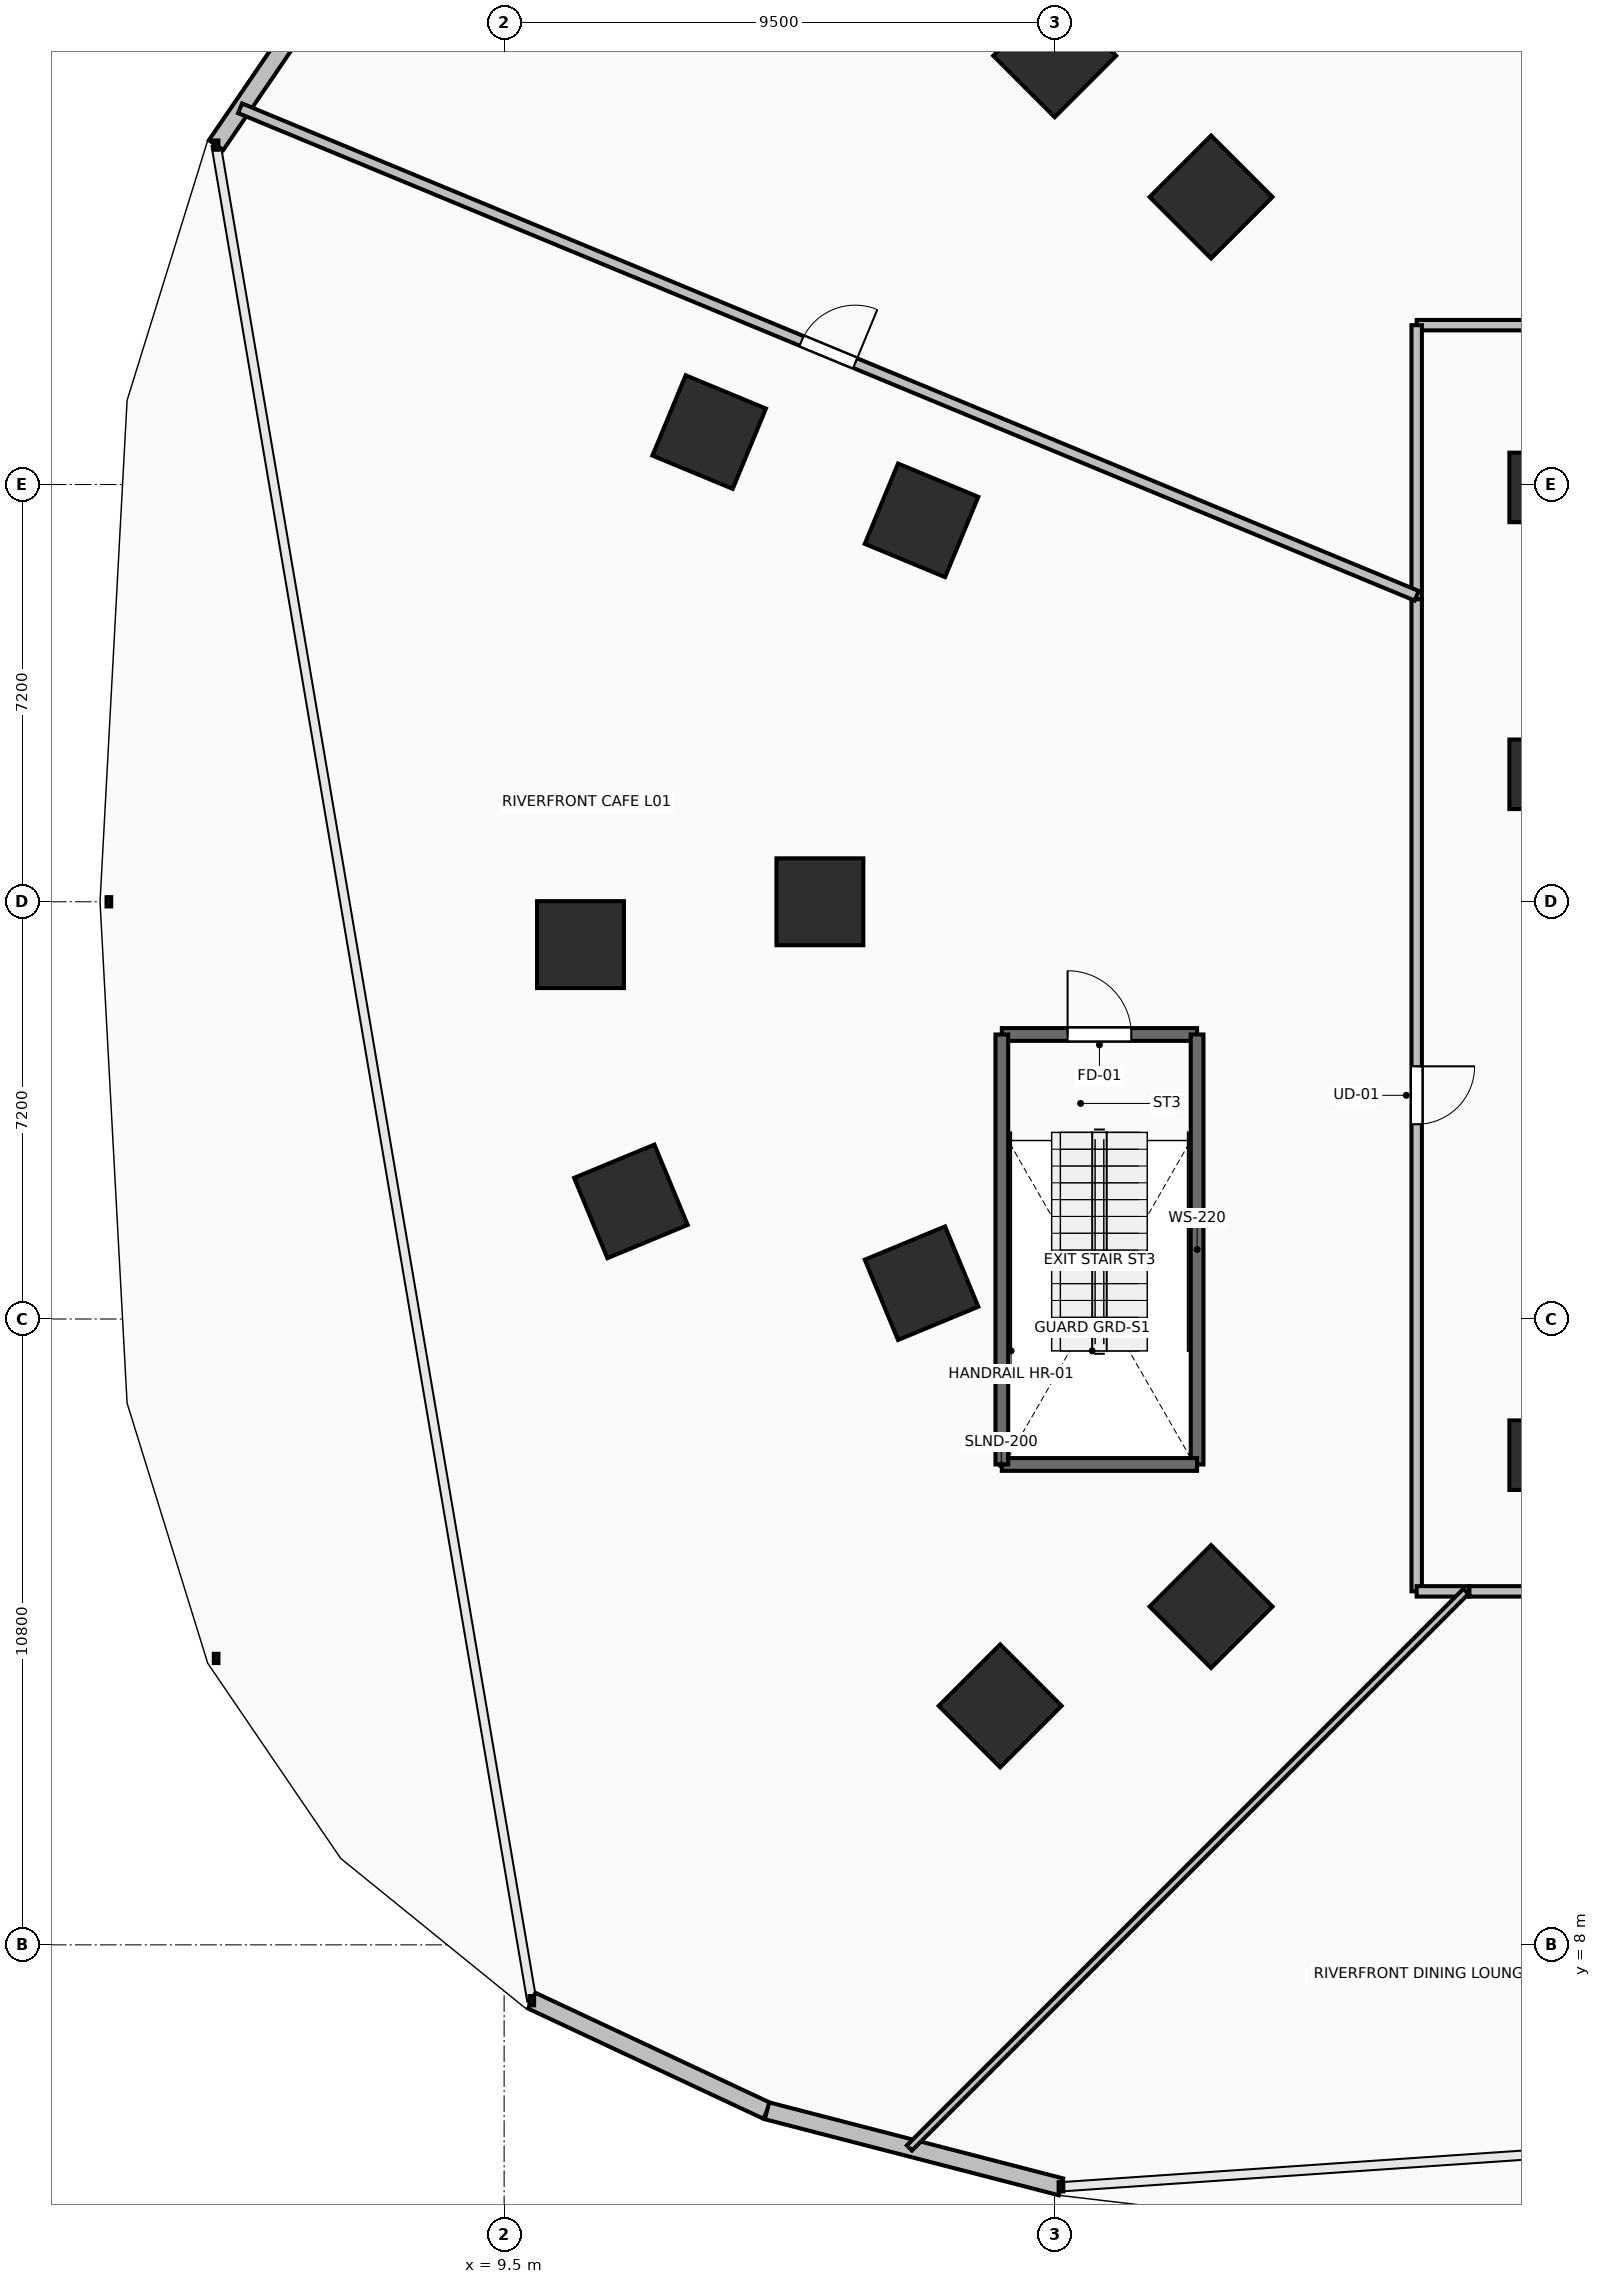
"""IFC4 building model, lengths in metres.
Left out: names, types, materials, properties, quantities, classifications, styles, units other than length and angle.
Written with IfcOpenShell. Run it as: python <this file> out.ifc"""

import sys

from ifc_helpers import new_model, si_unit, direction, frame, frame_2d, origin, origin_2d, place, context, subcontext, project, spatial, rectangle, extrude, element, fill, save


model = new_model("IFC4")
c1 = context("Model", 3, precision=1e-05, world=origin(), true_north=direction((0.0, 1.0)))
c2 = subcontext(c1, "Body", "Model", "MODEL_VIEW")
j1 = project(units=[si_unit("LENGTHUNIT", "METRE"), si_unit("PLANEANGLEUNIT", "RADIAN")], contexts=[c1])
p1 = place(None, origin())
s1 = spatial("IfcSite", under=j1, at=p1, CompositionType="ELEMENT")
p2 = place(p1, origin())
s2 = spatial("IfcBuilding", under=s1, at=p2, CompositionType="ELEMENT")
p3 = place(p2, frame((0.0, 0.0, 4.8)))
s3 = spatial("IfcBuildingStorey", under=s2, at=p3, CompositionType="ELEMENT", Elevation=4.8)
for number, where, z_axis, x_axis in (
    (1, (21.701, 38.162, 0.0), (0.0, 0.0, 1.0), (-0.707, 0.707, 0.0)),
    (2, (16.705, 32.582, 0.0), (0.0, 0.0, 1.0), (-0.924, 0.383, 0.0)),
    (3, (14.95, 26.0, 0.0), (0.0, 0.0, 1.0), (-1.0, 0.0, 0.0)),
    (4, (16.705, 19.418, 0.0), (0.0, 0.0, 1.0), (-0.924, -0.383, 0.0)),
    (5, (21.701, 13.838, 0.0), (0.0, 0.0, 1.0), (-0.707, -0.707, 0.0)),
    (6, (19.003, 40.6, 0.0), (0.0, 0.0, 1.0), (-0.707, 0.707, 0.0)),
    (7, (13.039, 34.105, 0.0), (0.0, 0.0, 1.0), (-0.924, 0.383, 0.0)),
    (8, (10.818, 25.261, 0.0), (0.0, 0.0, 1.0), (-1.0, 0.0, 0.0)),
    (9, (11.688, 20.83, 0.0), (0.0, 0.0, 1.0), (-0.924, -0.383, 0.0)),
    (10, (18.061, 12.124, 0.0), (0.0, 0.0, 1.0), (-0.707, -0.707, 0.0)),
):
    element("IfcColumn", number, at=place(p3, frame(where, z_axis=z_axis, x_axis=x_axis)), inside=s3, PredefinedType="COLUMN", context=c2, shape_type="SweptSolid", body=[
        extrude(rectangle(XDim=1.5, YDim=1.5, at=origin_2d()), origin(), (0.0, 0.0, 1.0), 4.8),
    ])
for number, where, z_axis, x_axis in (
    (11, (27.25, 16.45, 0.0), (0.0, 0.0, 1.0), (1.0, 0.0, 0.0)),
    (12, (27.25, 28.2, 0.0), (0.0, 0.0, 1.0), (1.0, 0.0, 0.0)),
    (13, (27.25, 33.15, 0.0), (0.0, 0.0, 1.0), (1.0, 0.0, 0.0)),
):
    element("IfcColumn", number, at=place(p3, frame(where, z_axis=z_axis, x_axis=x_axis)), inside=s3, PredefinedType="PILASTER", context=c2, shape_type="SweptSolid", body=[
        extrude(rectangle(XDim=0.8, YDim=1.2, at=origin_2d()), origin(), (0.0, 0.0, 1.0), 4.8),
    ])
p4 = place(p3, frame((6.813, 42.404, 0.0), z_axis=(0.0, 0.0, 1.0), x_axis=(-0.563802284854, -0.825909791438, 0.0)))
e14 = element("IfcWall", 14, at=p4, inside=s3, PredefinedType="STANDARD", context=c2, shape_type="SweptSolid", body=[
    extrude(rectangle(XDim=4.052, YDim=0.3, at=frame_2d((2.026, 0.0))), origin(), (0.0, 0.0, 1.0), 4.48),
])
p5 = place(p3, frame((9.978, 7.037, 0.0), z_axis=(0.0, 0.0, 1.0), x_axis=(0.905655072563, -0.424015199657, 0.0)))
e15 = element("IfcWall", 15, at=p5, inside=s3, PredefinedType="STANDARD", context=c2, shape_type="SweptSolid", body=[
    extrude(rectangle(XDim=4.482, YDim=0.3, at=frame_2d((2.241, 0.0))), origin(), (0.0, 0.0, 1.0), 4.48),
])
p6 = place(p3, frame((14.037, 5.136, 0.0), z_axis=(0.0, 0.0, 1.0), x_axis=(0.968182342492, -0.250245782556, 0.0)))
e16 = element("IfcWall", 16, at=p6, inside=s3, PredefinedType="STANDARD", context=c2, shape_type="SweptSolid", body=[
    extrude(rectangle(XDim=5.24, YDim=0.3, at=frame_2d((2.62, 0.0))), origin(), (0.0, 0.0, 1.0), 4.48),
])
p7 = place(p3, frame((18.09, 23.71, 0.0), z_axis=(0.0, 0.0, 1.0), x_axis=(1.0, 0.0, 0.0)))
e17 = element("IfcWall", 17, at=p7, inside=s3, PredefinedType="SOLIDWALL", context=c2, shape_type="SweptSolid", body=[
    extrude(rectangle(XDim=3.37, YDim=0.22, at=frame_2d((1.685, 0.0))), origin(), (0.0, 0.0, 1.0), 4.48),
])
p8 = place(p7, frame((1.135, 0.0, 0.0)))
e18 = element("IfcOpeningElement", 18, at=p8, cuts=e17, PredefinedType="OPENING", context=c2, shape_type="SweptSolid", body=[
    extrude(rectangle(XDim=1.1, YDim=2.15, at=frame_2d((0.55, 1.075))), frame((0.0, 0.125, 0.0), z_axis=(0.0, -1.0, 0.0), x_axis=(1.0, 0.0, 0.0)), (0.0, 0.0, 1.0), 0.25),
])
p9 = place(p3, frame((21.46, 23.71, 0.0), z_axis=(0.0, 0.0, 1.0), x_axis=(0.0, -1.0, 0.0)))
e19 = element("IfcWall", 19, at=p9, inside=s3, PredefinedType="SOLIDWALL", context=c2, shape_type="SweptSolid", body=[
    extrude(rectangle(XDim=7.42, YDim=0.22, at=frame_2d((3.71, 0.0))), origin(), (0.0, 0.0, 1.0), 4.48),
])
p10 = place(p3, frame((21.46, 16.29, 0.0), z_axis=(0.0, 0.0, 1.0), x_axis=(-1.0, 0.0, 0.0)))
e20 = element("IfcWall", 20, at=p10, inside=s3, PredefinedType="SOLIDWALL", context=c2, shape_type="SweptSolid", body=[
    extrude(rectangle(XDim=3.37, YDim=0.22, at=frame_2d((1.685, 0.0))), origin(), (0.0, 0.0, 1.0), 4.48),
])
p11 = place(p3, frame((18.09, 16.29, 0.0), z_axis=(0.0, 0.0, 1.0), x_axis=(0.0, 1.0, 0.0)))
e21 = element("IfcWall", 21, at=p11, inside=s3, PredefinedType="SOLIDWALL", context=c2, shape_type="SweptSolid", body=[
    extrude(rectangle(XDim=7.42, YDim=0.22, at=frame_2d((3.71, 0.0))), origin(), (0.0, 0.0, 1.0), 4.48),
])
p12 = place(p3, frame((37.94, 35.95, 0.0), z_axis=(0.0, 0.0, 1.0), x_axis=(-1.0, 0.0, 0.0)))
e22 = element("IfcWall", 22, at=p12, inside=s3, PredefinedType="PARTITIONING", context=c2, shape_type="SweptSolid", body=[
    extrude(rectangle(XDim=12.69, YDim=0.18, at=frame_2d((6.345, 0.0))), origin(), (0.0, 0.0, 1.0), 3.672),
])
p13 = place(p12, frame((5.745, 0.0, 0.0)))
e23 = element("IfcOpeningElement", 23, at=p13, cuts=e22, PredefinedType="OPENING", context=c2, shape_type="SweptSolid", body=[
    extrude(rectangle(XDim=1.2, YDim=2.15, at=frame_2d((0.6, 1.075))), frame((0.0, 0.105, 0.0), z_axis=(0.0, -1.0, 0.0), x_axis=(1.0, 0.0, 0.0)), (0.0, 0.0, 1.0), 0.21),
])
p14 = place(p3, frame((25.25, 35.95, 0.0), z_axis=(0.0, 0.0, 1.0), x_axis=(0.0, -1.0, 0.0)))
e24 = element("IfcWall", 24, at=p14, inside=s3, PredefinedType="PARTITIONING", context=c2, shape_type="SweptSolid", body=[
    extrude(rectangle(XDim=4.729, YDim=0.18, at=frame_2d((2.365, 0.0))), origin(), (0.0, 0.0, 1.0), 3.672),
])
p15 = place(p3, frame((25.25, 31.221, 0.0), z_axis=(0.0, 0.0, 1.0), x_axis=(0.0, -1.0, 0.0)))
e25 = element("IfcWall", 25, at=p15, inside=s3, PredefinedType="PARTITIONING", context=c2, shape_type="SweptSolid", body=[
    extrude(rectangle(XDim=17.121, YDim=0.18, at=frame_2d((8.561, 0.0))), origin(), (0.0, 0.0, 1.0), 3.672),
])
p16 = place(p15, frame((8.061, 0.0, 0.0)))
e26 = element("IfcOpeningElement", 26, at=p16, cuts=e25, PredefinedType="OPENING", context=c2, shape_type="SweptSolid", body=[
    extrude(rectangle(XDim=1.0, YDim=2.15, at=frame_2d((0.5, 1.075))), frame((0.0, 0.105, 0.0), z_axis=(0.0, -1.0, 0.0), x_axis=(1.0, 0.0, 0.0)), (0.0, 0.0, 1.0), 0.21),
])
p17 = place(p3, frame((25.25, 14.1, 0.0), z_axis=(0.0, 0.0, 1.0), x_axis=(1.0, 0.0, 0.0)))
e27 = element("IfcWall", 27, at=p17, inside=s3, PredefinedType="PARTITIONING", context=c2, shape_type="SweptSolid", body=[
    extrude(rectangle(XDim=0.91, YDim=0.18, at=frame_2d((0.455, 0.0))), origin(), (0.0, 0.0, 1.0), 4.126),
])
p18 = place(p3, frame((26.16, 14.1, 0.0), z_axis=(0.0, 0.0, 1.0), x_axis=(1.0, 0.0, 0.0)))
e28 = element("IfcWall", 28, at=p18, inside=s3, PredefinedType="PARTITIONING", context=c2, shape_type="SweptSolid", body=[
    extrude(rectangle(XDim=6.971, YDim=0.18, at=frame_2d((3.486, 0.0))), origin(), (0.0, 0.0, 1.0), 3.672),
])
p19 = place(p18, frame((2.986, 0.0, 0.0)))
e29 = element("IfcOpeningElement", 29, at=p19, cuts=e28, PredefinedType="OPENING", context=c2, shape_type="SweptSolid", body=[
    extrude(rectangle(XDim=1.0, YDim=2.15, at=frame_2d((0.5, 1.075))), frame((0.0, 0.105, 0.0), z_axis=(0.0, -1.0, 0.0), x_axis=(1.0, 0.0, 0.0)), (0.0, 0.0, 1.0), 0.21),
])
p20 = place(p3, frame((4.943, 39.693, 0.0), z_axis=(0.0, 0.0, 1.0), x_axis=(0.923867913948, -0.382711480854, 0.0)))
e30 = element("IfcWall", 30, at=p20, inside=s3, PredefinedType="PARTITIONING", context=c2, shape_type="SweptSolid", body=[
    extrude(rectangle(XDim=21.98, YDim=0.18, at=frame_2d((10.99, 0.0))), origin(), (0.0, 0.0, 1.0), 3.769),
])
p21 = place(p20, frame((10.49, 0.0, 0.0)))
e31 = element("IfcOpeningElement", 31, at=p21, cuts=e30, PredefinedType="OPENING", context=c2, shape_type="SweptSolid", body=[
    extrude(rectangle(XDim=1.0, YDim=2.15, at=frame_2d((0.5, 1.075))), frame((0.0, 0.105, 0.0), z_axis=(0.0, -1.0, 0.0), x_axis=(1.0, 0.0, 0.0)), (0.0, 0.0, 1.0), 0.21),
])
p22 = place(p3, frame((16.495, 4.495, 0.0), z_axis=(0.0, 0.0, 1.0), x_axis=(0.707106781187, 0.707106781187, 0.0)))
e32 = element("IfcWall", 32, at=p22, inside=s3, PredefinedType="PARTITIONING", context=c2, shape_type="SweptSolid", body=[
    extrude(rectangle(XDim=13.583, YDim=0.125, at=frame_2d((6.792, 0.0))), origin(), (0.0, 0.0, 1.0), 3.769),
])
p23 = place(p8, origin())
e33 = element("IfcDoor", 33, at=p23, inside=s3, OperationType="SINGLE_SWING_LEFT", PredefinedType="DOOR", context=c2, shape_type="SweptSolid", body=[
    extrude(rectangle(XDim=1.1, YDim=2.15, at=frame_2d((0.55, 1.075))), frame((0.0, 0.025, 0.0), z_axis=(0.0, -1.0, 0.0), x_axis=(1.0, 0.0, 0.0)), (0.0, 0.0, 1.0), 0.05),
])
fill(e18, e33)
p24 = place(p16, origin())
e34 = element("IfcDoor", 34, at=p24, inside=s3, OperationType="SINGLE_SWING_LEFT", PredefinedType="DOOR", context=c2, shape_type="SweptSolid", body=[
    extrude(rectangle(XDim=1.0, YDim=2.15, at=frame_2d((0.5, 1.075))), frame((0.0, 0.025, 0.0), z_axis=(0.0, -1.0, 0.0), x_axis=(1.0, 0.0, 0.0)), (0.0, 0.0, 1.0), 0.05),
])
fill(e26, e34)
p25 = place(p21, origin())
e35 = element("IfcDoor", 35, at=p25, inside=s3, OperationType="SINGLE_SWING_RIGHT", PredefinedType="DOOR", context=c2, shape_type="SweptSolid", body=[
    extrude(rectangle(XDim=1.0, YDim=2.15, at=frame_2d((0.5, 1.075))), frame((0.0, 0.025, 0.0), z_axis=(0.0, -1.0, 0.0), x_axis=(1.0, 0.0, 0.0)), (0.0, 0.0, 1.0), 0.05),
])
fill(e31, e35)
save(model, sys.argv[1])
